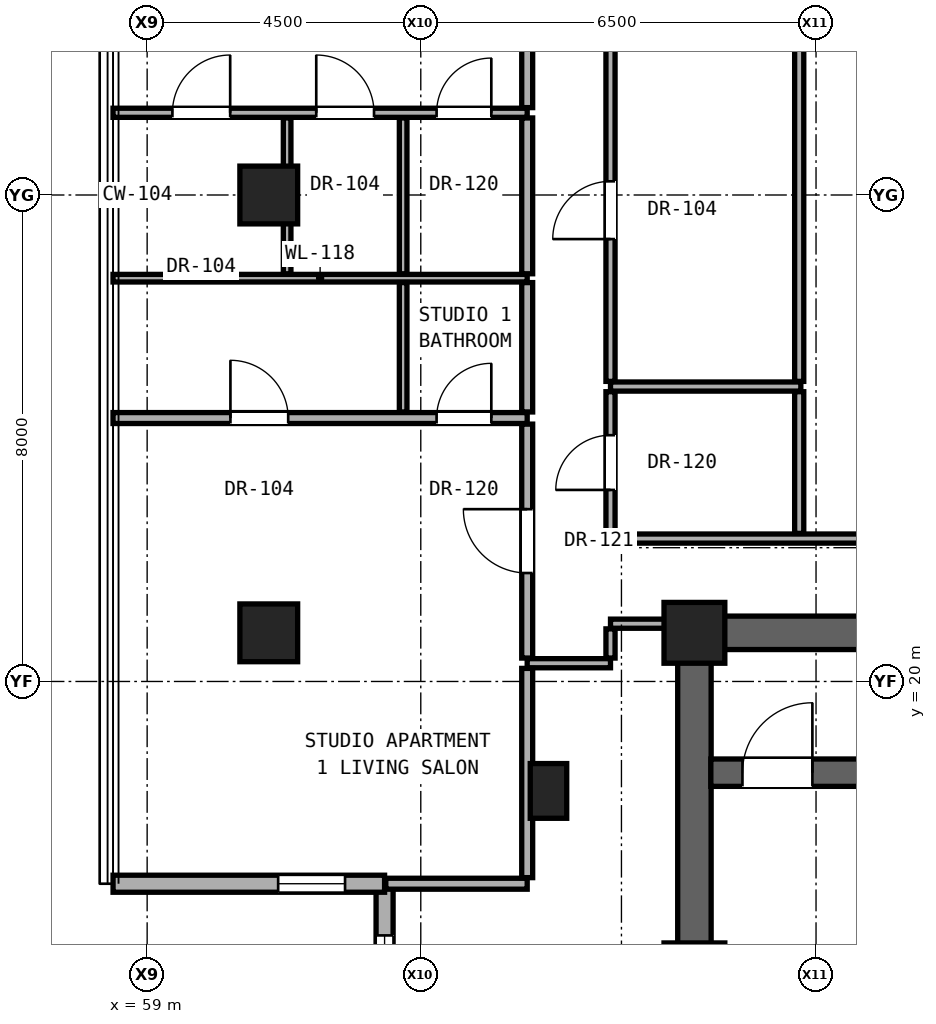
"""IFC4 building model, lengths in metres.
Left out: names, types, materials, properties, quantities, classifications, styles, units other than length and angle.
Written with IfcOpenShell. Run it as: python <this file> out.ifc"""

import sys

from ifc_helpers import new_model, si_unit, direction, frame, frame_2d, origin, origin_2d, place, context, subcontext, project, spatial, rectangle, hollow_rectangle, extrude, element, fill, save


model = new_model("IFC4")
c1 = context("Model", 3, precision=1e-05, world=origin(), true_north=direction((0.0, 1.0)))
c2 = subcontext(c1, "Body", "Model", "MODEL_VIEW")
j1 = project(units=[si_unit("LENGTHUNIT", "METRE"), si_unit("PLANEANGLEUNIT", "RADIAN")], contexts=[c1])
p1 = place(None, origin())
s1 = spatial("IfcSite", under=j1, at=p1, CompositionType="ELEMENT")
p2 = place(p1, origin())
s2 = spatial("IfcBuilding", under=s1, at=p2, CompositionType="ELEMENT")
p3 = place(p2, frame((0.0, 0.0, 173.9)))
s3 = spatial("IfcBuildingStorey", under=s2, at=p3, CompositionType="ELEMENT", Elevation=173.9)
for number, where, z_axis, x_axis in (
    (1, (68.0, 15.2, 0.0), (0.0, 0.0, 1.0), (1.0, 0.0, 0.0)),
    (2, (68.0, 20.8, 0.0), (0.0, 0.0, 1.0), (1.0, 0.0, 0.0)),
):
    element("IfcColumn", number, at=place(p3, frame(where, z_axis=z_axis, x_axis=x_axis)), inside=s3, PredefinedType="COLUMN", context=c2, shape_type="SweptSolid", body=[
        extrude(rectangle(XDim=1.0, YDim=1.0, at=origin_2d()), origin(), (0.0, 0.0, 1.0), 3.25),
    ])
for number, where, z_axis, x_axis in (
    (3, (61.0, 20.8, 0.0), (0.0, 0.0, 1.0), (1.0, 0.0, 0.0)),
    (4, (61.0, 28.0, 0.0), (0.0, 0.0, 1.0), (1.0, 0.0, 0.0)),
):
    element("IfcColumn", number, at=place(p3, frame(where, z_axis=z_axis, x_axis=x_axis)), inside=s3, PredefinedType="COLUMN", context=c2, shape_type="SweptSolid", body=[
        extrude(hollow_rectangle(XDim=0.95, YDim=0.95, WallThickness=0.05, at=origin_2d()), origin(), (0.0, 0.0, 1.0), 3.25),
    ])
p4 = place(p3, frame((65.6, 18.2, 0.0), z_axis=(0.0, 0.0, 1.0), x_axis=(1.0, 0.0, 0.0)))
e5 = element("IfcColumn", 5, at=p4, inside=s3, PredefinedType="PILASTER", context=c2, shape_type="SweptSolid", body=[
    extrude(rectangle(XDim=0.6, YDim=0.9, at=origin_2d()), origin(), (0.0, 0.0, 1.0), 3.25),
])
p5 = place(p3, frame((68.0, 15.2, 0.0), z_axis=(0.0, 0.0, 1.0), x_axis=(0.0, 1.0, 0.0)))
e6 = element("IfcWall", 6, at=p5, inside=s3, PredefinedType="SHEAR", context=c2, shape_type="SweptSolid", body=[
    extrude(rectangle(XDim=5.6, YDim=0.55, at=frame_2d((2.8, 0.0))), origin(), (0.0, 0.0, 1.0), 3.05),
])
p6 = place(p3, frame((68.0, 20.8, 0.0), z_axis=(0.0, 0.0, 1.0), x_axis=(1.0, 0.0, 0.0)))
e7 = element("IfcWall", 7, at=p6, inside=s3, PredefinedType="SHEAR", context=c2, shape_type="SweptSolid", body=[
    extrude(rectangle(XDim=17.0, YDim=0.55, at=frame_2d((8.5, 0.0))), origin(), (0.0, 0.0, 1.0), 3.05),
])
p7 = place(p6, frame((9.55, 0.0, 0.0)))
e8 = element("IfcOpeningElement", 8, at=p7, cuts=e7, PredefinedType="OPENING", context=c2, shape_type="SweptSolid", body=[
    extrude(rectangle(XDim=1.3, YDim=2.3, at=frame_2d((0.65, 1.15))), frame((0.0, 0.285, 0.0), z_axis=(0.0, -1.0, 0.0), x_axis=(1.0, 0.0, 0.0)), (0.0, 0.0, 1.0), 0.57),
])
p8 = place(p6, frame((12.05, 0.0, 0.0)))
e9 = element("IfcOpeningElement", 9, at=p8, cuts=e7, PredefinedType="OPENING", context=c2, shape_type="SweptSolid", body=[
    extrude(rectangle(XDim=1.3, YDim=2.3, at=frame_2d((0.65, 1.15))), frame((0.0, 0.285, 0.0), z_axis=(0.0, -1.0, 0.0), x_axis=(1.0, 0.0, 0.0)), (0.0, 0.0, 1.0), 0.57),
])
p9 = place(p3, frame((62.905, 16.674, 0.0), z_axis=(0.0, 0.0, 1.0), x_axis=(0.0, -1.0, 0.0)))
e10 = element("IfcWall", 10, at=p9, inside=s3, PredefinedType="SOLIDWALL", context=c2, shape_type="SweptSolid", body=[
    extrude(rectangle(XDim=4.465, YDim=0.28, at=frame_2d((2.232, 0.0))), origin(), (0.0, 0.0, 1.0), 3.03),
])
p10 = place(p9, frame((0.85, 0.0, 0.68)))
e11 = element("IfcOpeningElement", 11, at=p10, cuts=e10, PredefinedType="OPENING", context=c2, shape_type="SweptSolid", body=[
    extrude(rectangle(XDim=1.65, YDim=2.2, at=frame_2d((0.825, 1.1))), frame((0.0, 0.15, 0.0), z_axis=(0.0, -1.0, 0.0), x_axis=(1.0, 0.0, 0.0)), (0.0, 0.0, 1.0), 0.3),
])
p11 = place(p3, frame((58.439, 16.674, 0.0), z_axis=(0.0, 0.0, 1.0), x_axis=(1.0, 0.0, 0.0)))
e12 = element("IfcWall", 12, at=p11, inside=s3, PredefinedType="SOLIDWALL", context=c2, shape_type="SweptSolid", body=[
    extrude(rectangle(XDim=4.465, YDim=0.28, at=frame_2d((2.233, 0.0))), origin(), (0.0, 0.0, 1.0), 3.03),
])
p12 = place(p11, frame((2.715, 0.0, 0.85)))
e13 = element("IfcOpeningElement", 13, at=p12, cuts=e12, PredefinedType="OPENING", context=c2, shape_type="SweptSolid", body=[
    extrude(rectangle(XDim=1.1, YDim=2.0, at=frame_2d((0.55, 1.0))), frame((0.0, 0.15, 0.0), z_axis=(0.0, -1.0, 0.0), x_axis=(1.0, 0.0, 0.0)), (0.0, 0.0, 1.0), 0.3),
])
p13 = place(p3, frame((62.925, 16.674, 0.0), z_axis=(0.0, 0.0, 1.0), x_axis=(1.0, 0.0, 0.0)))
e14 = element("IfcWall", 14, at=p13, inside=s3, PredefinedType="PARTITIONING", context=c2, shape_type="SweptSolid", body=[
    extrude(rectangle(XDim=2.325, YDim=0.18, at=frame_2d((1.163, 0.0))), origin(), (0.0, 0.0, 1.0), 3.05),
])
p14 = place(p3, frame((68.27, 18.5, 0.0), z_axis=(0.0, 0.0, 1.0), x_axis=(1.0, 0.0, 0.0)))
e15 = element("IfcWall", 15, at=p14, inside=s3, PredefinedType="SHEAR", context=c2, shape_type="SweptSolid", body=[
    extrude(rectangle(XDim=8.95, YDim=0.45, at=frame_2d((4.475, 0.0))), origin(), (0.0, 0.0, 1.0), 3.05),
])
p15 = place(p14, frame((0.52, 0.0, 0.0)))
e16 = element("IfcOpeningElement", 16, at=p15, cuts=e15, PredefinedType="OPENING", context=c2, shape_type="SweptSolid", body=[
    extrude(rectangle(XDim=1.15, YDim=2.2, at=frame_2d((0.575, 1.1))), frame((0.0, 0.235, 0.0), z_axis=(0.0, -1.0, 0.0), x_axis=(1.0, 0.0, 0.0)), (0.0, 0.0, 1.0), 0.47),
])
p16 = place(p3, frame((65.25, 20.3, 0.0), z_axis=(0.0, 0.0, 1.0), x_axis=(1.0, 0.0, 0.0)))
e17 = element("IfcWall", 17, at=p16, inside=s3, PredefinedType="PARTITIONING", context=c2, shape_type="SweptSolid", body=[
    extrude(rectangle(XDim=1.37, YDim=0.15, at=frame_2d((0.685, 0.0))), origin(), (0.0, 0.0, 1.0), 3.05),
])
p17 = place(p3, frame((66.62, 20.95, 0.0), z_axis=(0.0, 0.0, 1.0), x_axis=(1.0, 0.0, 0.0)))
e18 = element("IfcWall", 18, at=p17, inside=s3, PredefinedType="PARTITIONING", context=c2, shape_type="SweptSolid", body=[
    extrude(rectangle(XDim=1.11, YDim=0.15, at=frame_2d((0.555, 0.0))), origin(), (0.0, 0.0, 1.0), 2.442),
])
p18 = place(p3, frame((66.62, 22.35, 0.0), z_axis=(0.0, 0.0, 1.0), x_axis=(1.0, 0.0, 0.0)))
e19 = element("IfcWall", 19, at=p18, inside=s3, PredefinedType="PARTITIONING", context=c2, shape_type="SweptSolid", body=[
    extrude(rectangle(XDim=10.14, YDim=0.15, at=frame_2d((5.07, 0.0))), origin(), (0.0, 0.0, 1.0), 2.186),
])
p19 = place(p3, frame((58.439, 24.332, 0.0), z_axis=(0.0, 0.0, 1.0), x_axis=(1.0, 0.0, 0.0)))
e20 = element("IfcWall", 20, at=p19, inside=s3, PredefinedType="PARTITIONING", context=c2, shape_type="SweptSolid", body=[
    extrude(rectangle(XDim=6.811, YDim=0.18, at=frame_2d((3.406, 0.0))), origin(), (0.0, 0.0, 1.0), 2.269),
])
p20 = place(p19, frame((1.93, 0.0, 0.0)))
e21 = element("IfcOpeningElement", 21, at=p20, cuts=e20, PredefinedType="OPENING", context=c2, shape_type="SweptSolid", body=[
    extrude(rectangle(XDim=0.95, YDim=2.15, at=frame_2d((0.475, 1.075))), frame((0.0, 0.1, 0.0), z_axis=(0.0, -1.0, 0.0), x_axis=(1.0, 0.0, 0.0)), (0.0, 0.0, 1.0), 0.2),
])
p21 = place(p19, frame((5.321, 0.0, 0.0)))
e22 = element("IfcOpeningElement", 22, at=p21, cuts=e20, PredefinedType="OPENING", context=c2, shape_type="SweptSolid", body=[
    extrude(rectangle(XDim=0.9, YDim=2.1, at=frame_2d((0.45, 1.05))), frame((0.0, 0.1, 0.0), z_axis=(0.0, -1.0, 0.0), x_axis=(1.0, 0.0, 0.0)), (0.0, 0.0, 1.0), 0.2),
])
p22 = place(p3, frame((66.62, 24.85, 0.0), z_axis=(0.0, 0.0, 1.0), x_axis=(1.0, 0.0, 0.0)))
e23 = element("IfcWall", 23, at=p22, inside=s3, PredefinedType="PARTITIONING", context=c2, shape_type="SweptSolid", body=[
    extrude(rectangle(XDim=3.13, YDim=0.15, at=frame_2d((1.565, 0.0))), origin(), (0.0, 0.0, 1.0), 2.186),
])
p23 = place(p3, frame((58.439, 26.632, 0.0), z_axis=(0.0, 0.0, 1.0), x_axis=(1.0, 0.0, 0.0)))
e24 = element("IfcWall", 24, at=p23, inside=s3, PredefinedType="PARTITIONING", context=c2, shape_type="SweptSolid", body=[
    extrude(rectangle(XDim=6.811, YDim=0.125, at=frame_2d((3.406, 0.0))), origin(), (0.0, 0.0, 1.0), 2.269),
])
p24 = place(p3, frame((58.439, 29.352, 0.0), z_axis=(0.0, 0.0, 1.0), x_axis=(1.0, 0.0, 0.0)))
e25 = element("IfcWall", 25, at=p24, inside=s3, PredefinedType="PARTITIONING", context=c2, shape_type="SweptSolid", body=[
    extrude(rectangle(XDim=6.811, YDim=0.15, at=frame_2d((3.406, 0.0))), origin(), (0.0, 0.0, 1.0), 2.269),
])
p25 = place(p24, frame((0.977, 0.0, 0.0)))
e26 = element("IfcOpeningElement", 26, at=p25, cuts=e25, PredefinedType="OPENING", context=c2, shape_type="SweptSolid", body=[
    extrude(rectangle(XDim=0.95, YDim=2.15, at=frame_2d((0.475, 1.075))), frame((0.0, 0.085, 0.0), z_axis=(0.0, -1.0, 0.0), x_axis=(1.0, 0.0, 0.0)), (0.0, 0.0, 1.0), 0.17),
])
p26 = place(p24, frame((3.342, 0.0, 0.0)))
e27 = element("IfcOpeningElement", 27, at=p26, cuts=e25, PredefinedType="OPENING", context=c2, shape_type="SweptSolid", body=[
    extrude(rectangle(XDim=0.95, YDim=2.15, at=frame_2d((0.475, 1.075))), frame((0.0, 0.085, 0.0), z_axis=(0.0, -1.0, 0.0), x_axis=(1.0, 0.0, 0.0)), (0.0, 0.0, 1.0), 0.17),
])
p27 = place(p24, frame((5.321, 0.0, 0.0)))
e28 = element("IfcOpeningElement", 28, at=p27, cuts=e25, PredefinedType="OPENING", context=c2, shape_type="SweptSolid", body=[
    extrude(rectangle(XDim=0.9, YDim=2.1, at=frame_2d((0.45, 1.05))), frame((0.0, 0.085, 0.0), z_axis=(0.0, -1.0, 0.0), x_axis=(1.0, 0.0, 0.0)), (0.0, 0.0, 1.0), 0.17),
])
p28 = place(p3, frame((61.302, 26.705, 0.0), z_axis=(0.0, 0.0, 1.0), x_axis=(0.0, 1.0, 0.0)))
e29 = element("IfcWall", 29, at=p28, inside=s3, PredefinedType="PARTITIONING", context=c2, shape_type="SweptSolid", body=[
    extrude(rectangle(XDim=2.562, YDim=0.125, at=frame_2d((1.281, 0.0))), origin(), (0.0, 0.0, 1.0), 2.346),
])
p29 = place(p3, frame((63.21, 24.432, 0.0), z_axis=(0.0, 0.0, 1.0), x_axis=(0.0, 1.0, 0.0)))
e30 = element("IfcWall", 30, at=p29, inside=s3, PredefinedType="PARTITIONING", context=c2, shape_type="SweptSolid", body=[
    extrude(rectangle(XDim=2.128, YDim=0.125, at=frame_2d((1.064, 0.0))), origin(), (0.0, 0.0, 1.0), 3.05),
])
p30 = place(p3, frame((63.21, 26.705, 0.0), z_axis=(0.0, 0.0, 1.0), x_axis=(0.0, 1.0, 0.0)))
e31 = element("IfcWall", 31, at=p30, inside=s3, PredefinedType="PARTITIONING", context=c2, shape_type="SweptSolid", body=[
    extrude(rectangle(XDim=2.562, YDim=0.125, at=frame_2d((1.281, 0.0))), origin(), (0.0, 0.0, 1.0), 2.346),
])
p31 = place(p3, frame((65.25, 16.774, 0.0), z_axis=(0.0, 0.0, 1.0), x_axis=(0.0, 1.0, 0.0)))
e32 = element("IfcWall", 32, at=p31, inside=s3, PredefinedType="PARTITIONING", context=c2, shape_type="SweptSolid", body=[
    extrude(rectangle(XDim=3.441, YDim=0.18, at=frame_2d((1.721, 0.0))), origin(), (0.0, 0.0, 1.0), 2.493),
])
p32 = place(p3, frame((65.25, 20.385, 0.0), z_axis=(0.0, 0.0, 1.0), x_axis=(0.0, 1.0, 0.0)))
e33 = element("IfcWall", 33, at=p32, inside=s3, PredefinedType="PARTITIONING", context=c2, shape_type="SweptSolid", body=[
    extrude(rectangle(XDim=3.847, YDim=0.18, at=frame_2d((1.923, 0.0))), origin(), (0.0, 0.0, 1.0), 2.442),
])
p33 = place(p32, frame((1.398, 0.0, 0.0)))
e34 = element("IfcOpeningElement", 34, at=p33, cuts=e33, PredefinedType="OPENING", context=c2, shape_type="SweptSolid", body=[
    extrude(rectangle(XDim=1.05, YDim=2.2, at=frame_2d((0.525, 1.1))), frame((0.0, 0.1, 0.0), z_axis=(0.0, -1.0, 0.0), x_axis=(1.0, 0.0, 0.0)), (0.0, 0.0, 1.0), 0.2),
])
p34 = place(p3, frame((65.25, 24.432, 0.0), z_axis=(0.0, 0.0, 1.0), x_axis=(0.0, 1.0, 0.0)))
e35 = element("IfcWall", 35, at=p34, inside=s3, PredefinedType="PARTITIONING", context=c2, shape_type="SweptSolid", body=[
    extrude(rectangle(XDim=2.128, YDim=0.18, at=frame_2d((1.064, 0.0))), origin(), (0.0, 0.0, 1.0), 3.05),
])
p35 = place(p3, frame((65.25, 26.705, 0.0), z_axis=(0.0, 0.0, 1.0), x_axis=(0.0, 1.0, 0.0)))
e36 = element("IfcWall", 36, at=p35, inside=s3, PredefinedType="PARTITIONING", context=c2, shape_type="SweptSolid", body=[
    extrude(rectangle(XDim=2.562, YDim=0.18, at=frame_2d((1.281, 0.0))), origin(), (0.0, 0.0, 1.0), 2.346),
])
p36 = place(p3, frame((65.25, 29.437, 0.0), z_axis=(0.0, 0.0, 1.0), x_axis=(0.0, 1.0, 0.0)))
e37 = element("IfcWall", 37, at=p36, inside=s3, PredefinedType="PARTITIONING", context=c2, shape_type="SweptSolid", body=[
    extrude(rectangle(XDim=6.178, YDim=0.18, at=frame_2d((3.089, 0.0))), origin(), (0.0, 0.0, 1.0), 2.442),
])
p37 = place(p36, frame((2.564, 0.0, 0.0)))
e38 = element("IfcOpeningElement", 38, at=p37, cuts=e37, PredefinedType="OPENING", context=c2, shape_type="SweptSolid", body=[
    extrude(rectangle(XDim=1.05, YDim=2.2, at=frame_2d((0.525, 1.1))), frame((0.0, 0.1, 0.0), z_axis=(0.0, -1.0, 0.0), x_axis=(1.0, 0.0, 0.0)), (0.0, 0.0, 1.0), 0.2),
])
p38 = place(p3, frame((66.62, 20.385, 0.0), z_axis=(0.0, 0.0, 1.0), x_axis=(0.0, 1.0, 0.0)))
e39 = element("IfcWall", 39, at=p38, inside=s3, PredefinedType="PARTITIONING", context=c2, shape_type="SweptSolid", body=[
    extrude(rectangle(XDim=0.48, YDim=0.15, at=frame_2d((0.24, 0.0))), origin(), (0.0, 0.0, 1.0), 2.442),
])
p39 = place(p3, frame((66.62, 22.435, 0.0), z_axis=(0.0, 0.0, 1.0), x_axis=(0.0, 1.0, 0.0)))
e40 = element("IfcWall", 40, at=p39, inside=s3, PredefinedType="PARTITIONING", context=c2, shape_type="SweptSolid", body=[
    extrude(rectangle(XDim=2.33, YDim=0.15, at=frame_2d((1.165, 0.0))), origin(), (0.0, 0.0, 1.0), 3.05),
])
p40 = place(p39, frame((0.715, 0.0, 0.0)))
e41 = element("IfcOpeningElement", 41, at=p40, cuts=e40, PredefinedType="OPENING", context=c2, shape_type="SweptSolid", body=[
    extrude(rectangle(XDim=0.9, YDim=2.1, at=frame_2d((0.45, 1.05))), frame((0.0, 0.085, 0.0), z_axis=(0.0, -1.0, 0.0), x_axis=(1.0, 0.0, 0.0)), (0.0, 0.0, 1.0), 0.17),
])
p41 = place(p3, frame((66.62, 24.935, 0.0), z_axis=(0.0, 0.0, 1.0), x_axis=(0.0, 1.0, 0.0)))
e42 = element("IfcWall", 42, at=p41, inside=s3, PredefinedType="PARTITIONING", context=c2, shape_type="SweptSolid", body=[
    extrude(rectangle(XDim=5.63, YDim=0.15, at=frame_2d((2.815, 0.0))), origin(), (0.0, 0.0, 1.0), 2.346),
])
p42 = place(p41, frame((2.34, 0.0, 0.0)))
e43 = element("IfcOpeningElement", 43, at=p42, cuts=e42, PredefinedType="OPENING", context=c2, shape_type="SweptSolid", body=[
    extrude(rectangle(XDim=0.95, YDim=2.15, at=frame_2d((0.475, 1.075))), frame((0.0, 0.085, 0.0), z_axis=(0.0, -1.0, 0.0), x_axis=(1.0, 0.0, 0.0)), (0.0, 0.0, 1.0), 0.17),
])
p43 = place(p3, frame((69.723, 22.435, 0.0), z_axis=(0.0, 0.0, 1.0), x_axis=(0.0, 1.0, 0.0)))
e44 = element("IfcWall", 44, at=p43, inside=s3, PredefinedType="PARTITIONING", context=c2, shape_type="SweptSolid", body=[
    extrude(rectangle(XDim=2.33, YDim=0.15, at=frame_2d((1.165, 0.0))), origin(), (0.0, 0.0, 1.0), 3.05),
])
p44 = place(p3, frame((69.723, 24.935, 0.0), z_axis=(0.0, 0.0, 1.0), x_axis=(0.0, 1.0, 0.0)))
e45 = element("IfcWall", 45, at=p44, inside=s3, PredefinedType="PARTITIONING", context=c2, shape_type="SweptSolid", body=[
    extrude(rectangle(XDim=5.63, YDim=0.15, at=frame_2d((2.815, 0.0))), origin(), (0.0, 0.0, 1.0), 2.186),
])
p45 = place(p10, origin())
e46 = element("IfcWindow", 46, at=p45, inside=s3, PartitioningType="SINGLE_PANEL", PredefinedType="WINDOW", context=c2, shape_type="SweptSolid", body=[
    extrude(rectangle(XDim=1.65, YDim=2.2, at=frame_2d((0.825, 1.1))), frame((0.0, 0.03, 0.0), z_axis=(0.0, -1.0, 0.0), x_axis=(1.0, 0.0, 0.0)), (0.0, 0.0, 1.0), 0.06),
])
fill(e11, e46)
p46 = place(p12, origin())
e47 = element("IfcWindow", 47, at=p46, inside=s3, PartitioningType="SINGLE_PANEL", PredefinedType="WINDOW", context=c2, shape_type="SweptSolid", body=[
    extrude(rectangle(XDim=1.1, YDim=2.0, at=frame_2d((0.55, 1.0))), frame((0.0, 0.03, 0.0), z_axis=(0.0, -1.0, 0.0), x_axis=(1.0, 0.0, 0.0)), (0.0, 0.0, 1.0), 0.06),
])
fill(e13, e47)
p47 = place(p15, origin())
e48 = element("IfcDoor", 48, at=p47, inside=s3, OperationType="SINGLE_SWING_RIGHT", PredefinedType="DOOR", context=c2, shape_type="SweptSolid", body=[
    extrude(rectangle(XDim=1.15, YDim=2.2, at=frame_2d((0.575, 1.1))), frame((0.0, 0.025, 0.0), z_axis=(0.0, -1.0, 0.0), x_axis=(1.0, 0.0, 0.0)), (0.0, 0.0, 1.0), 0.05),
])
fill(e16, e48)
p48 = place(p40, origin())
e49 = element("IfcDoor", 49, at=p48, inside=s3, OperationType="SINGLE_SWING_LEFT", PredefinedType="DOOR", context=c2, shape_type="SweptSolid", body=[
    extrude(rectangle(XDim=0.9, YDim=2.1, at=frame_2d((0.45, 1.05))), frame((0.0, 0.025, 0.0), z_axis=(0.0, -1.0, 0.0), x_axis=(1.0, 0.0, 0.0)), (0.0, 0.0, 1.0), 0.05),
])
fill(e41, e49)
p49 = place(p33, origin())
e50 = element("IfcDoor", 50, at=p49, inside=s3, OperationType="SINGLE_SWING_RIGHT", PredefinedType="DOOR", context=c2, shape_type="SweptSolid", body=[
    extrude(rectangle(XDim=1.05, YDim=2.2, at=frame_2d((0.525, 1.1))), frame((0.0, 0.025, 0.0), z_axis=(0.0, -1.0, 0.0), x_axis=(1.0, 0.0, 0.0)), (0.0, 0.0, 1.0), 0.05),
])
fill(e34, e50)
p50 = place(p20, origin())
e51 = element("IfcDoor", 51, at=p50, inside=s3, OperationType="SINGLE_SWING_LEFT", PredefinedType="DOOR", context=c2, shape_type="SweptSolid", body=[
    extrude(rectangle(XDim=0.95, YDim=2.15, at=frame_2d((0.475, 1.075))), frame((0.0, 0.025, 0.0), z_axis=(0.0, -1.0, 0.0), x_axis=(1.0, 0.0, 0.0)), (0.0, 0.0, 1.0), 0.05),
])
fill(e21, e51)
p51 = place(p21, origin())
e52 = element("IfcDoor", 52, at=p51, inside=s3, OperationType="SINGLE_SWING_RIGHT", PredefinedType="DOOR", context=c2, shape_type="SweptSolid", body=[
    extrude(rectangle(XDim=0.9, YDim=2.1, at=frame_2d((0.45, 1.05))), frame((0.0, 0.025, 0.0), z_axis=(0.0, -1.0, 0.0), x_axis=(1.0, 0.0, 0.0)), (0.0, 0.0, 1.0), 0.05),
])
fill(e22, e52)
p52 = place(p25, origin())
e53 = element("IfcDoor", 53, at=p52, inside=s3, OperationType="SINGLE_SWING_RIGHT", PredefinedType="DOOR", context=c2, shape_type="SweptSolid", body=[
    extrude(rectangle(XDim=0.95, YDim=2.15, at=frame_2d((0.475, 1.075))), frame((0.0, 0.025, 0.0), z_axis=(0.0, -1.0, 0.0), x_axis=(1.0, 0.0, 0.0)), (0.0, 0.0, 1.0), 0.05),
])
fill(e26, e53)
p53 = place(p26, origin())
e54 = element("IfcDoor", 54, at=p53, inside=s3, OperationType="SINGLE_SWING_LEFT", PredefinedType="DOOR", context=c2, shape_type="SweptSolid", body=[
    extrude(rectangle(XDim=0.95, YDim=2.15, at=frame_2d((0.475, 1.075))), frame((0.0, 0.025, 0.0), z_axis=(0.0, -1.0, 0.0), x_axis=(1.0, 0.0, 0.0)), (0.0, 0.0, 1.0), 0.05),
])
fill(e27, e54)
p54 = place(p27, origin())
e55 = element("IfcDoor", 55, at=p54, inside=s3, OperationType="SINGLE_SWING_RIGHT", PredefinedType="DOOR", context=c2, shape_type="SweptSolid", body=[
    extrude(rectangle(XDim=0.9, YDim=2.1, at=frame_2d((0.45, 1.05))), frame((0.0, 0.025, 0.0), z_axis=(0.0, -1.0, 0.0), x_axis=(1.0, 0.0, 0.0)), (0.0, 0.0, 1.0), 0.05),
])
fill(e28, e55)
p55 = place(p42, origin())
e56 = element("IfcDoor", 56, at=p55, inside=s3, OperationType="SINGLE_SWING_LEFT", PredefinedType="DOOR", context=c2, shape_type="SweptSolid", body=[
    extrude(rectangle(XDim=0.95, YDim=2.15, at=frame_2d((0.475, 1.075))), frame((0.0, 0.025, 0.0), z_axis=(0.0, -1.0, 0.0), x_axis=(1.0, 0.0, 0.0)), (0.0, 0.0, 1.0), 0.05),
])
fill(e43, e56)
save(model, sys.argv[1])
